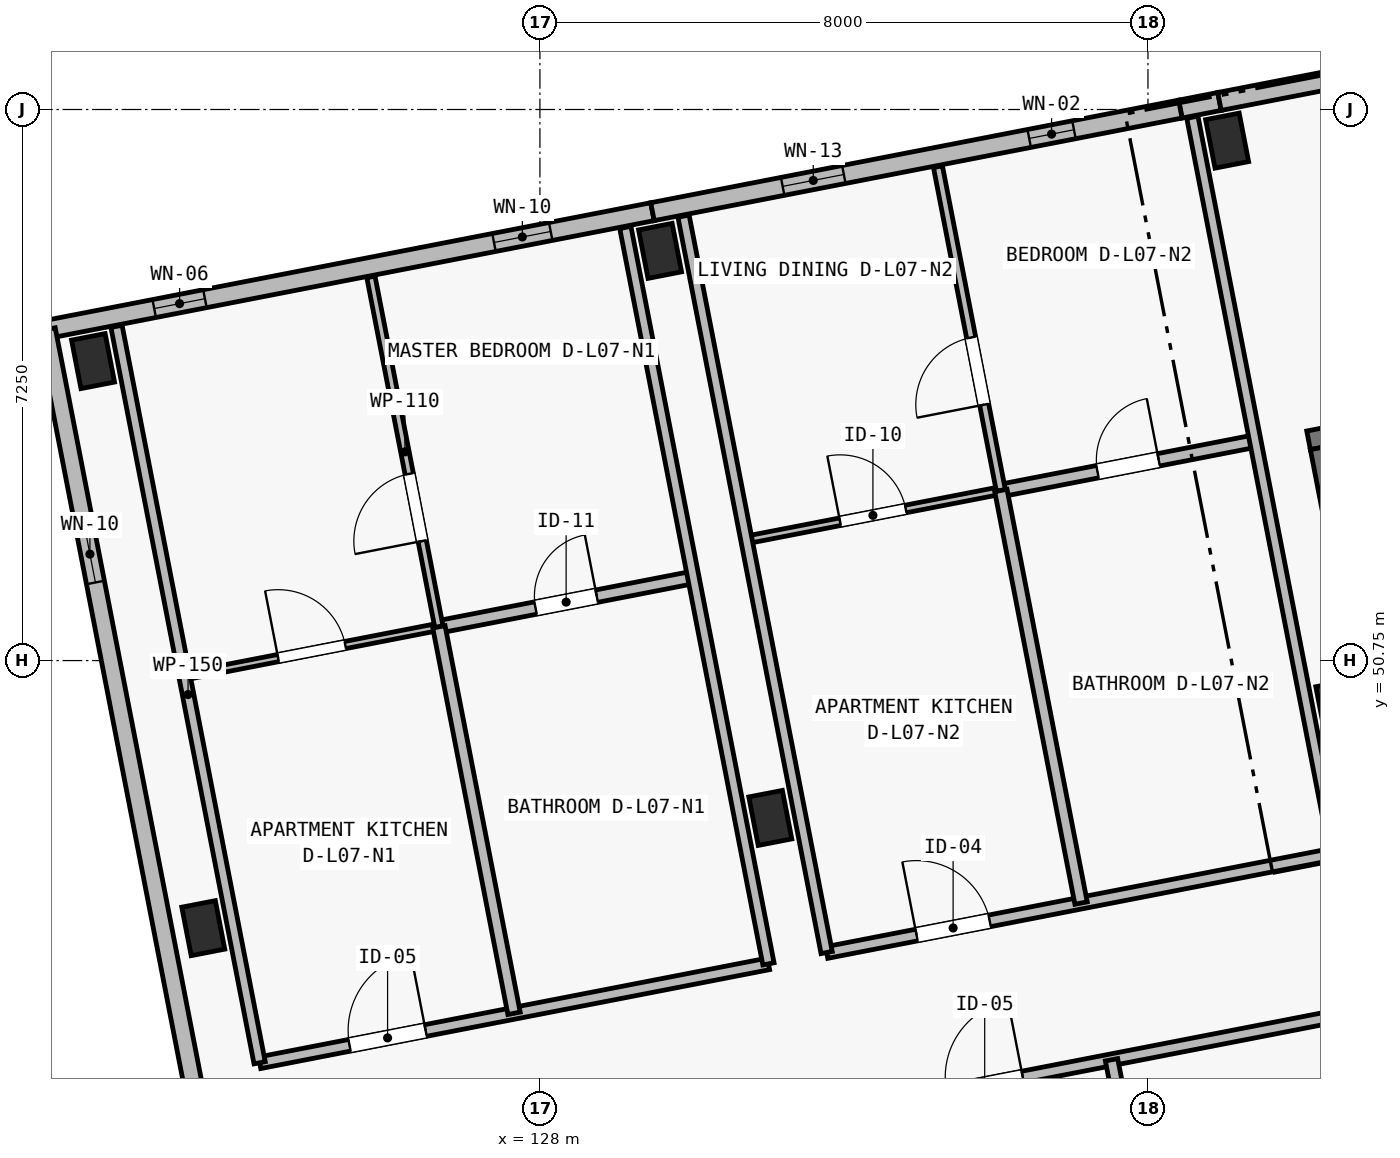
"""IFC4 building model, lengths in metres.
Left out: names, types, materials, properties, quantities, classifications, styles, units other than length and angle.
Written with IfcOpenShell. Run it as: python <this file> out.ifc"""

import sys

from ifc_helpers import new_model, si_unit, direction, frame, frame_2d, origin, origin_2d, place, context, subcontext, project, spatial, polyline, rectangle, outline, extrude, element, fill, save


model = new_model("IFC4")
c1 = context("Model", 3, precision=1e-05, world=origin(), true_north=direction((0.0, 1.0)))
c2 = subcontext(c1, "Body", "Model", "MODEL_VIEW")
j1 = project(units=[si_unit("LENGTHUNIT", "METRE"), si_unit("PLANEANGLEUNIT", "RADIAN")], contexts=[c1])
p1 = place(None, origin())
s1 = spatial("IfcSite", under=j1, at=p1, CompositionType="ELEMENT")
p2 = place(p1, origin())
s2 = spatial("IfcBuilding", under=s1, at=p2, CompositionType="ELEMENT")
p3 = place(p2, frame((0.0, 0.0, 24.65)))
s3 = spatial("IfcBuildingStorey", under=s2, at=p3, CompositionType="ELEMENT", Elevation=24.65)
for number, where, z_axis, x_axis in (
    (1, (123.571, 47.23, 0.0), (0.0, 0.0, 1.0), (0.982, 0.191, 0.0)),
    (2, (122.121, 54.69, 0.0), (0.0, 0.0, 1.0), (0.982, 0.191, 0.0)),
    (3, (131.031, 48.68, 0.0), (0.0, 0.0, 1.0), (0.982, 0.191, 0.0)),
    (4, (129.581, 56.14, 0.0), (0.0, 0.0, 1.0), (0.982, 0.191, 0.0)),
    (5, (138.491, 50.13, 0.0), (0.0, 0.0, 1.0), (0.982, 0.191, 0.0)),
    (6, (137.041, 57.59, 0.0), (0.0, 0.0, 1.0), (0.982, 0.191, 0.0)),
):
    element("IfcColumn", number, at=place(p3, frame(where, z_axis=z_axis, x_axis=x_axis)), inside=s3, PredefinedType="COLUMN", context=c2, shape_type="SweptSolid", body=[
        extrude(rectangle(XDim=0.45, YDim=0.65, at=origin_2d()), origin(), (0.0, 0.0, 1.0), 3.25),
    ])
p4 = place(p3, frame((138.113, 53.647, 0.0), z_axis=(0.0, 0.0, 1.0), x_axis=(0.981626097708, 0.19081458094, 0.0)))
e7 = element("IfcWall", 7, at=p4, inside=s3, PredefinedType="SHEAR", context=c2, shape_type="SweptSolid", body=[
    extrude(rectangle(XDim=7.0, YDim=0.25, at=frame_2d((3.5, 0.0))), origin(), (0.0, 0.0, 1.0), 3.25),
])
p5 = place(p4, frame((0.45, 0.0, 0.0)))
e8 = element("IfcOpeningElement", 8, at=p5, cuts=e7, PredefinedType="OPENING", context=c2, shape_type="SweptSolid", body=[
    extrude(rectangle(XDim=0.9, YDim=2.1, at=frame_2d((0.45, 1.05))), frame((0.0, 0.14, 0.0), z_axis=(0.0, -1.0, 0.0), x_axis=(1.0, 0.0, 0.0)), (0.0, 0.0, 1.0), 0.28),
])
p6 = place(p3, frame((138.804, 50.751, 0.0), z_axis=(0.0, 0.0, 1.0), x_axis=(-0.190858194834, 0.981617618762, 0.0)))
e9 = element("IfcWall", 9, at=p6, inside=s3, PredefinedType="SHEAR", context=c2, shape_type="SweptSolid", body=[
    extrude(rectangle(XDim=2.85, YDim=0.25, at=frame_2d((1.425, 0.0))), origin(), (0.0, 0.0, 1.0), 3.25),
])
p7 = place(p3, frame((121.505, 55.105, 0.0), z_axis=(0.0, 0.0, 1.0), x_axis=(0.981628367112, 0.190802905848, 0.0)))
e10 = element("IfcWall", 10, at=p7, inside=s3, PredefinedType="SOLIDWALL", context=c2, shape_type="SweptSolid", body=[
    extrude(outline(polyline([(0.0, 0.0), (8.125, 0.0), (8.125, 5.091), (0.0, 3.409), (0.0, 0.0)])), frame((0.0, 0.12, 0.0), z_axis=(0.0, -1.0, 0.0), x_axis=(1.0, 0.0, 0.0)), (0.0, 0.0, 1.0), 0.24),
])
p8 = place(p7, frame((1.447, 0.0, 0.44)))
e11 = element("IfcOpeningElement", 11, at=p8, cuts=e10, PredefinedType="OPENING", context=c2, shape_type="SweptSolid", body=[
    extrude(rectangle(XDim=0.68, YDim=2.24, at=frame_2d((0.34, 1.12))), frame((0.0, 0.135, 0.0), z_axis=(0.0, -1.0, 0.0), x_axis=(1.0, 0.0, 0.0)), (0.0, 0.0, 1.0), 0.27),
])
p9 = place(p7, frame((6.001, 0.0, 0.5)))
e12 = element("IfcOpeningElement", 12, at=p9, cuts=e10, PredefinedType="OPENING", context=c2, shape_type="SweptSolid", body=[
    extrude(rectangle(XDim=0.76, YDim=2.34, at=frame_2d((0.38, 1.17))), frame((0.0, 0.135, 0.0), z_axis=(0.0, -1.0, 0.0), x_axis=(1.0, 0.0, 0.0)), (0.0, 0.0, 1.0), 0.27),
])
p10 = place(p3, frame((136.426, 58.006, 0.0), z_axis=(0.0, 0.0, 1.0), x_axis=(0.981656509867, 0.190658062077, 0.0)))
e13 = element("IfcWall", 13, at=p10, inside=s3, PredefinedType="SOLIDWALL", context=c2, shape_type="SweptSolid", body=[
    extrude(rectangle(XDim=0.525, YDim=0.24, at=frame_2d((0.262, 0.0))), origin(), (0.0, 0.0, 1.0), 3.0),
])
p11 = place(p3, frame((129.481, 56.656, 0.0), z_axis=(0.0, 0.0, 1.0), x_axis=(0.981624188584, 0.190824401971, 0.0)))
e14 = element("IfcWall", 14, at=p11, inside=s3, PredefinedType="SOLIDWALL", context=c2, shape_type="SweptSolid", body=[
    extrude(outline(polyline([(0.0, 0.0), (7.075, 0.0), (7.075, 6.555), (0.0, 5.091), (0.0, 0.0)])), frame((0.0, 0.12, 0.0), z_axis=(0.0, -1.0, 0.0), x_axis=(1.0, 0.0, 0.0)), (0.0, 0.0, 1.0), 0.24),
])
p12 = place(p11, frame((1.745, 0.0, 0.5)))
e15 = element("IfcOpeningElement", 15, at=p12, cuts=e14, PredefinedType="OPENING", context=c2, shape_type="SweptSolid", body=[
    extrude(rectangle(XDim=0.82, YDim=2.18, at=frame_2d((0.41, 1.09))), frame((0.0, 0.135, 0.0), z_axis=(0.0, -1.0, 0.0), x_axis=(1.0, 0.0, 0.0)), (0.0, 0.0, 1.0), 0.27),
])
p13 = place(p11, frame((5.05, 0.0, 0.44)))
e16 = element("IfcOpeningElement", 16, at=p13, cuts=e14, PredefinedType="OPENING", context=c2, shape_type="SweptSolid", body=[
    extrude(rectangle(XDim=0.6, YDim=2.22, at=frame_2d((0.3, 1.11))), frame((0.0, 0.135, 0.0), z_axis=(0.0, -1.0, 0.0), x_axis=(1.0, 0.0, 0.0)), (0.0, 0.0, 1.0), 0.27),
])
p14 = place(p3, frame((136.941, 58.106, 0.0), z_axis=(0.0, 0.0, 1.0), x_axis=(0.981629832251, 0.190795367961, 0.0)))
e17 = element("IfcWall", 17, at=p14, inside=s3, PredefinedType="SOLIDWALL", context=c2, shape_type="SweptSolid", body=[
    extrude(rectangle(XDim=2.375, YDim=0.24, at=frame_2d((1.188, 0.0))), origin(), (0.0, 0.0, 1.0), 3.0),
])
p15 = place(p3, frame((125.445, 34.835, 0.0), z_axis=(0.0, 0.0, 1.0), x_axis=(-0.190808900739, 0.981627201843, 0.0)))
e18 = element("IfcWall", 18, at=p15, inside=s3, PredefinedType="SOLIDWALL", context=c2, shape_type="SweptSolid", body=[
    extrude(rectangle(XDim=20.65, YDim=0.24, at=frame_2d((10.325, 0.0))), origin(), (0.0, 0.0, 1.0), 3.409),
])
p16 = place(p15, frame((2.99, 0.0, 0.52)))
e19 = element("IfcOpeningElement", 19, at=p16, cuts=e18, PredefinedType="OPENING", context=c2, shape_type="SweptSolid", body=[
    extrude(rectangle(XDim=0.62, YDim=2.28, at=frame_2d((0.31, 1.14))), frame((0.0, 0.135, 0.0), z_axis=(0.0, -1.0, 0.0), x_axis=(1.0, 0.0, 0.0)), (0.0, 0.0, 1.0), 0.27),
])
p17 = place(p15, frame((17.26, 0.0, 0.45)))
e20 = element("IfcOpeningElement", 20, at=p17, cuts=e18, PredefinedType="OPENING", context=c2, shape_type="SweptSolid", body=[
    extrude(rectangle(XDim=0.76, YDim=2.34, at=frame_2d((0.38, 1.17))), frame((0.0, 0.135, 0.0), z_axis=(0.0, -1.0, 0.0), x_axis=(1.0, 0.0, 0.0)), (0.0, 0.0, 1.0), 0.27),
])
p18 = place(p3, frame((132.021, 44.818, 0.0), z_axis=(0.0, 0.0, 1.0), x_axis=(0.981629109582, 0.190799086008, 0.0)))
e21 = element("IfcWall", 21, at=p18, inside=s3, PredefinedType="PARTITIONING", context=c2, shape_type="SweptSolid", body=[
    extrude(rectangle(XDim=7.13, YDim=0.155, at=frame_2d((3.565, 0.0))), origin(), (0.0, 0.0, 1.0), 2.97),
])
p19 = place(p18, frame((1.355, 0.0, 0.0)))
e22 = element("IfcOpeningElement", 22, at=p19, cuts=e21, PredefinedType="OPENING", context=c2, shape_type="SweptSolid", body=[
    extrude(rectangle(XDim=1.02, YDim=2.2, at=frame_2d((0.51, 1.1))), frame((0.0, 0.093, 0.0), z_axis=(0.0, -1.0, 0.0), x_axis=(1.0, 0.0, 0.0)), (0.0, 0.0, 1.0), 0.185),
])
p20 = place(p3, frame((136.297, 41.503, 0.0), z_axis=(0.0, 0.0, 1.0), x_axis=(-0.190807044121, 0.981627562731, 0.0)))
e23 = element("IfcWall", 23, at=p20, inside=s3, PredefinedType="PLUMBINGWALL", context=c2, shape_type="SweptSolid", body=[
    extrude(rectangle(XDim=4.07, YDim=0.165, at=frame_2d((2.035, 0.0))), origin(), (0.0, 0.0, 1.0), 2.97),
])
p21 = place(p3, frame((124.312, 45.459, 0.0), z_axis=(0.0, 0.0, 1.0), x_axis=(0.981627870431, 0.190805461121, 0.0)))
e24 = element("IfcWall", 24, at=p21, inside=s3, PredefinedType="PARTITIONING", context=c2, shape_type="SweptSolid", body=[
    extrude(rectangle(XDim=6.82, YDim=0.155, at=frame_2d((3.41, 0.0))), origin(), (0.0, 0.0, 1.0), 3.15),
])
p22 = place(p21, frame((1.205, 0.0, 0.0)))
e25 = element("IfcOpeningElement", 25, at=p22, cuts=e24, PredefinedType="OPENING", context=c2, shape_type="SweptSolid", body=[
    extrude(rectangle(XDim=1.02, YDim=2.2, at=frame_2d((0.51, 1.1))), frame((0.0, 0.093, 0.0), z_axis=(0.0, -1.0, 0.0), x_axis=(1.0, 0.0, 0.0)), (0.0, 0.0, 1.0), 0.185),
])
p23 = place(p3, frame((123.324, 50.543, 0.0), z_axis=(0.0, 0.0, 1.0), x_axis=(0.981629173664, 0.190798756314, 0.0)))
e26 = element("IfcWall", 26, at=p23, inside=s3, PredefinedType="PARTITIONING", context=c2, shape_type="SweptSolid", body=[
    extrude(rectangle(XDim=3.41, YDim=0.095, at=frame_2d((1.705, 0.0))), origin(), (0.0, 0.0, 1.0), 3.15),
])
p24 = place(p23, frame((1.255, 0.0, 0.0)))
e27 = element("IfcOpeningElement", 27, at=p24, cuts=e26, PredefinedType="OPENING", context=c2, shape_type="SweptSolid", body=[
    extrude(rectangle(XDim=0.9, YDim=2.1, at=frame_2d((0.45, 1.05))), frame((0.0, 0.062, 0.0), z_axis=(0.0, -1.0, 0.0), x_axis=(1.0, 0.0, 0.0)), (0.0, 0.0, 1.0), 0.125),
])
p25 = place(p3, frame((126.671, 51.194, 0.0), z_axis=(0.0, 0.0, 1.0), x_axis=(0.981629173664, 0.190798756314, 0.0)))
e28 = element("IfcWall", 28, at=p25, inside=s3, PredefinedType="PLUMBINGWALL", context=c2, shape_type="SweptSolid", body=[
    extrude(rectangle(XDim=3.41, YDim=0.165, at=frame_2d((1.705, 0.0))), origin(), (0.0, 0.0, 1.0), 3.15),
])
p26 = place(p25, frame((1.295, 0.0, 0.0)))
e29 = element("IfcOpeningElement", 29, at=p26, cuts=e28, PredefinedType="OPENING", context=c2, shape_type="SweptSolid", body=[
    extrude(rectangle(XDim=0.82, YDim=2.08, at=frame_2d((0.41, 1.04))), frame((0.0, 0.097, 0.0), z_axis=(0.0, -1.0, 0.0), x_axis=(1.0, 0.0, 0.0)), (0.0, 0.0, 1.0), 0.195),
])
p27 = place(p3, frame((126.671, 51.194, 0.0), z_axis=(0.0, 0.0, 1.0), x_axis=(-0.190787451574, 0.981631370893, 0.0)))
e30 = element("IfcWall", 30, at=p27, inside=s3, PredefinedType="PARTITIONING", context=c2, shape_type="SweptSolid", body=[
    extrude(rectangle(XDim=4.69, YDim=0.11, at=frame_2d((2.345, 0.0))), origin(), (0.0, 0.0, 1.0), 3.15),
])
p28 = place(p27, frame((1.15, 0.0, 0.0)))
e31 = element("IfcOpeningElement", 31, at=p28, cuts=e30, PredefinedType="OPENING", context=c2, shape_type="SweptSolid", body=[
    extrude(rectangle(XDim=0.9, YDim=2.1, at=frame_2d((0.45, 1.05))), frame((0.0, 0.07, 0.0), z_axis=(0.0, -1.0, 0.0), x_axis=(1.0, 0.0, 0.0)), (0.0, 0.0, 1.0), 0.14),
])
p29 = place(p3, frame((127.66, 46.109, 0.0), z_axis=(0.0, 0.0, 1.0), x_axis=(-0.190838120755, 0.981621521599, 0.0)))
e32 = element("IfcWall", 32, at=p29, inside=s3, PredefinedType="PLUMBINGWALL", context=c2, shape_type="SweptSolid", body=[
    extrude(rectangle(XDim=5.18, YDim=0.165, at=frame_2d((2.59, 0.0))), origin(), (0.0, 0.0, 1.0), 3.15),
])
p30 = place(p3, frame((124.312, 45.459, 0.0), z_axis=(0.0, 0.0, 1.0), x_axis=(-0.190814044018, 0.981626202078, 0.0)))
e33 = element("IfcWall", 33, at=p30, inside=s3, PredefinedType="PARTITIONING", context=c2, shape_type="SweptSolid", body=[
    extrude(rectangle(XDim=9.87, YDim=0.15, at=frame_2d((4.935, 0.0))), origin(), (0.0, 0.0, 1.0), 3.15),
])
p31 = place(p3, frame((131.007, 46.76, 0.0), z_axis=(0.0, 0.0, 1.0), x_axis=(-0.190809410863, 0.981627102685, 0.0)))
e34 = element("IfcWall", 34, at=p31, inside=s3, PredefinedType="PARTITIONING", context=c2, shape_type="SweptSolid", body=[
    extrude(rectangle(XDim=9.87, YDim=0.15, at=frame_2d((4.935, 0.0))), origin(), (0.0, 0.0, 1.0), 3.15),
])
p32 = place(p3, frame((131.772, 46.909, 0.0), z_axis=(0.0, 0.0, 1.0), x_axis=(0.981622468528, 0.190833249935, 0.0)))
e35 = element("IfcWall", 35, at=p32, inside=s3, PredefinedType="PARTITIONING", context=c2, shape_type="SweptSolid", body=[
    extrude(rectangle(XDim=6.82, YDim=0.155, at=frame_2d((3.41, 0.0))), origin(), (0.0, 0.0, 1.0), 2.97),
])
p33 = place(p32, frame((1.205, 0.0, 0.0)))
e36 = element("IfcOpeningElement", 36, at=p33, cuts=e35, PredefinedType="OPENING", context=c2, shape_type="SweptSolid", body=[
    extrude(rectangle(XDim=0.98, YDim=2.15, at=frame_2d((0.49, 1.075))), frame((0.0, 0.093, 0.0), z_axis=(0.0, -1.0, 0.0), x_axis=(1.0, 0.0, 0.0)), (0.0, 0.0, 1.0), 0.185),
])
p34 = place(p3, frame((130.717, 52.337, 0.0), z_axis=(0.0, 0.0, 1.0), x_axis=(0.981629173664, 0.190798756314, 0.0)))
e37 = element("IfcWall", 37, at=p34, inside=s3, PredefinedType="PARTITIONING", context=c2, shape_type="SweptSolid", body=[
    extrude(rectangle(XDim=3.41, YDim=0.1, at=frame_2d((1.705, 0.0))), origin(), (0.0, 0.0, 1.0), 2.97),
])
p35 = place(p34, frame((1.255, 0.0, 0.0)))
e38 = element("IfcOpeningElement", 38, at=p35, cuts=e37, PredefinedType="OPENING", context=c2, shape_type="SweptSolid", body=[
    extrude(rectangle(XDim=0.88, YDim=2.1, at=frame_2d((0.44, 1.05))), frame((0.0, 0.065, 0.0), z_axis=(0.0, -1.0, 0.0), x_axis=(1.0, 0.0, 0.0)), (0.0, 0.0, 1.0), 0.13),
])
p36 = place(p3, frame((134.065, 52.988, 0.0), z_axis=(0.0, 0.0, 1.0), x_axis=(0.981629173664, 0.190798756314, 0.0)))
e39 = element("IfcWall", 39, at=p36, inside=s3, PredefinedType="PLUMBINGWALL", context=c2, shape_type="SweptSolid", body=[
    extrude(rectangle(XDim=3.41, YDim=0.165, at=frame_2d((1.705, 0.0))), origin(), (0.0, 0.0, 1.0), 2.97),
])
p37 = place(p36, frame((1.295, 0.0, 0.0)))
e40 = element("IfcOpeningElement", 40, at=p37, cuts=e39, PredefinedType="OPENING", context=c2, shape_type="SweptSolid", body=[
    extrude(rectangle(XDim=0.82, YDim=2.08, at=frame_2d((0.41, 1.04))), frame((0.0, 0.097, 0.0), z_axis=(0.0, -1.0, 0.0), x_axis=(1.0, 0.0, 0.0)), (0.0, 0.0, 1.0), 0.195),
])
p38 = place(p3, frame((134.065, 52.988, 0.0), z_axis=(0.0, 0.0, 1.0), x_axis=(-0.190812443151, 0.981626513262, 0.0)))
e41 = element("IfcWall", 41, at=p38, inside=s3, PredefinedType="PARTITIONING", context=c2, shape_type="SweptSolid", body=[
    extrude(rectangle(XDim=4.34, YDim=0.12, at=frame_2d((2.17, 0.0))), origin(), (0.0, 0.0, 1.0), 2.97),
])
p39 = place(p38, frame((1.15, 0.0, 0.0)))
e42 = element("IfcOpeningElement", 42, at=p39, cuts=e41, PredefinedType="OPENING", context=c2, shape_type="SweptSolid", body=[
    extrude(rectangle(XDim=0.9, YDim=2.1, at=frame_2d((0.45, 1.05))), frame((0.0, 0.075, 0.0), z_axis=(0.0, -1.0, 0.0), x_axis=(1.0, 0.0, 0.0)), (0.0, 0.0, 1.0), 0.15),
])
p40 = place(p3, frame((135.12, 47.559, 0.0), z_axis=(0.0, 0.0, 1.0), x_axis=(-0.190807031124, 0.981627565258, 0.0)))
e43 = element("IfcWall", 43, at=p40, inside=s3, PredefinedType="PLUMBINGWALL", context=c2, shape_type="SweptSolid", body=[
    extrude(rectangle(XDim=5.53, YDim=0.165, at=frame_2d((2.765, 0.0))), origin(), (0.0, 0.0, 1.0), 2.97),
])
p41 = place(p3, frame((131.772, 46.909, 0.0), z_axis=(0.0, 0.0, 1.0), x_axis=(-0.1907855758, 0.981631735462, 0.0)))
e44 = element("IfcWall", 44, at=p41, inside=s3, PredefinedType="PARTITIONING", context=c2, shape_type="SweptSolid", body=[
    extrude(rectangle(XDim=9.87, YDim=0.15, at=frame_2d((4.935, 0.0))), origin(), (0.0, 0.0, 1.0), 2.97),
])
p42 = place(p3, frame((138.467, 48.21, 0.0), z_axis=(0.0, 0.0, 1.0), x_axis=(-0.190814044018, 0.981626202078, 0.0)))
e45 = element("IfcWall", 45, at=p42, inside=s3, PredefinedType="PARTITIONING", context=c2, shape_type="SweptSolid", body=[
    extrude(rectangle(XDim=9.87, YDim=0.15, at=frame_2d((4.935, 0.0))), origin(), (0.0, 0.0, 1.0), 2.97),
])
p43 = place(p8, origin())
e46 = element("IfcWindow", 46, at=p43, inside=s3, PartitioningType="SINGLE_PANEL", PredefinedType="WINDOW", context=c2, shape_type="SweptSolid", body=[
    extrude(rectangle(XDim=0.68, YDim=2.24, at=frame_2d((0.34, 1.12))), frame((0.0, 0.03, 0.0), z_axis=(0.0, -1.0, 0.0), x_axis=(1.0, 0.0, 0.0)), (0.0, 0.0, 1.0), 0.06),
])
fill(e11, e46)
p44 = place(p9, origin())
e47 = element("IfcWindow", 47, at=p44, inside=s3, PartitioningType="SINGLE_PANEL", PredefinedType="WINDOW", context=c2, shape_type="SweptSolid", body=[
    extrude(rectangle(XDim=0.76, YDim=2.34, at=frame_2d((0.38, 1.17))), frame((0.0, 0.03, 0.0), z_axis=(0.0, -1.0, 0.0), x_axis=(1.0, 0.0, 0.0)), (0.0, 0.0, 1.0), 0.06),
])
fill(e12, e47)
p45 = place(p12, origin())
e48 = element("IfcWindow", 48, at=p45, inside=s3, PartitioningType="SINGLE_PANEL", PredefinedType="WINDOW", context=c2, shape_type="SweptSolid", body=[
    extrude(rectangle(XDim=0.82, YDim=2.18, at=frame_2d((0.41, 1.09))), frame((0.0, 0.03, 0.0), z_axis=(0.0, -1.0, 0.0), x_axis=(1.0, 0.0, 0.0)), (0.0, 0.0, 1.0), 0.06),
])
fill(e15, e48)
p46 = place(p13, origin())
e49 = element("IfcWindow", 49, at=p46, inside=s3, PartitioningType="SINGLE_PANEL", PredefinedType="WINDOW", context=c2, shape_type="SweptSolid", body=[
    extrude(rectangle(XDim=0.6, YDim=2.22, at=frame_2d((0.3, 1.11))), frame((0.0, 0.03, 0.0), z_axis=(0.0, -1.0, 0.0), x_axis=(1.0, 0.0, 0.0)), (0.0, 0.0, 1.0), 0.06),
])
fill(e16, e49)
p47 = place(p17, origin())
e50 = element("IfcWindow", 50, at=p47, inside=s3, PartitioningType="SINGLE_PANEL", PredefinedType="WINDOW", context=c2, shape_type="SweptSolid", body=[
    extrude(rectangle(XDim=0.76, YDim=2.34, at=frame_2d((0.38, 1.17))), frame((0.0, 0.03, 0.0), z_axis=(0.0, -1.0, 0.0), x_axis=(1.0, 0.0, 0.0)), (0.0, 0.0, 1.0), 0.06),
])
fill(e20, e50)
p48 = place(p19, origin())
e51 = element("IfcDoor", 51, at=p48, inside=s3, OperationType="SINGLE_SWING_RIGHT", PredefinedType="DOOR", context=c2, shape_type="SweptSolid", body=[
    extrude(rectangle(XDim=1.02, YDim=2.2, at=frame_2d((0.51, 1.1))), frame((0.0, 0.025, 0.0), z_axis=(0.0, -1.0, 0.0), x_axis=(1.0, 0.0, 0.0)), (0.0, 0.0, 1.0), 0.05),
])
fill(e22, e51)
p49 = place(p22, origin())
e52 = element("IfcDoor", 52, at=p49, inside=s3, OperationType="SINGLE_SWING_RIGHT", PredefinedType="DOOR", context=c2, shape_type="SweptSolid", body=[
    extrude(rectangle(XDim=1.02, YDim=2.2, at=frame_2d((0.51, 1.1))), frame((0.0, 0.025, 0.0), z_axis=(0.0, -1.0, 0.0), x_axis=(1.0, 0.0, 0.0)), (0.0, 0.0, 1.0), 0.05),
])
fill(e25, e52)
p50 = place(p24, origin())
e53 = element("IfcDoor", 53, at=p50, inside=s3, OperationType="SINGLE_SWING_LEFT", PredefinedType="DOOR", context=c2, shape_type="SweptSolid", body=[
    extrude(rectangle(XDim=0.9, YDim=2.1, at=frame_2d((0.45, 1.05))), frame((0.0, 0.025, 0.0), z_axis=(0.0, -1.0, 0.0), x_axis=(1.0, 0.0, 0.0)), (0.0, 0.0, 1.0), 0.05),
])
fill(e27, e53)
p51 = place(p26, origin())
e54 = element("IfcDoor", 54, at=p51, inside=s3, OperationType="SINGLE_SWING_RIGHT", PredefinedType="DOOR", context=c2, shape_type="SweptSolid", body=[
    extrude(rectangle(XDim=0.82, YDim=2.08, at=frame_2d((0.41, 1.04))), frame((0.0, 0.025, 0.0), z_axis=(0.0, -1.0, 0.0), x_axis=(1.0, 0.0, 0.0)), (0.0, 0.0, 1.0), 0.05),
])
fill(e29, e54)
p52 = place(p28, origin())
e55 = element("IfcDoor", 55, at=p52, inside=s3, OperationType="SINGLE_SWING_LEFT", PredefinedType="DOOR", context=c2, shape_type="SweptSolid", body=[
    extrude(rectangle(XDim=0.9, YDim=2.1, at=frame_2d((0.45, 1.05))), frame((0.0, 0.025, 0.0), z_axis=(0.0, -1.0, 0.0), x_axis=(1.0, 0.0, 0.0)), (0.0, 0.0, 1.0), 0.05),
])
fill(e31, e55)
p53 = place(p33, origin())
e56 = element("IfcDoor", 56, at=p53, inside=s3, OperationType="SINGLE_SWING_LEFT", PredefinedType="DOOR", context=c2, shape_type="SweptSolid", body=[
    extrude(rectangle(XDim=0.98, YDim=2.15, at=frame_2d((0.49, 1.075))), frame((0.0, 0.025, 0.0), z_axis=(0.0, -1.0, 0.0), x_axis=(1.0, 0.0, 0.0)), (0.0, 0.0, 1.0), 0.05),
])
fill(e36, e56)
p54 = place(p35, origin())
e57 = element("IfcDoor", 57, at=p54, inside=s3, OperationType="SINGLE_SWING_LEFT", PredefinedType="DOOR", context=c2, shape_type="SweptSolid", body=[
    extrude(rectangle(XDim=0.88, YDim=2.1, at=frame_2d((0.44, 1.05))), frame((0.0, 0.025, 0.0), z_axis=(0.0, -1.0, 0.0), x_axis=(1.0, 0.0, 0.0)), (0.0, 0.0, 1.0), 0.05),
])
fill(e38, e57)
p55 = place(p37, origin())
e58 = element("IfcDoor", 58, at=p55, inside=s3, OperationType="SINGLE_SWING_RIGHT", PredefinedType="DOOR", context=c2, shape_type="SweptSolid", body=[
    extrude(rectangle(XDim=0.82, YDim=2.08, at=frame_2d((0.41, 1.04))), frame((0.0, 0.025, 0.0), z_axis=(0.0, -1.0, 0.0), x_axis=(1.0, 0.0, 0.0)), (0.0, 0.0, 1.0), 0.05),
])
fill(e40, e58)
p56 = place(p39, origin())
e59 = element("IfcDoor", 59, at=p56, inside=s3, OperationType="SINGLE_SWING_LEFT", PredefinedType="DOOR", context=c2, shape_type="SweptSolid", body=[
    extrude(rectangle(XDim=0.9, YDim=2.1, at=frame_2d((0.45, 1.05))), frame((0.0, 0.025, 0.0), z_axis=(0.0, -1.0, 0.0), x_axis=(1.0, 0.0, 0.0)), (0.0, 0.0, 1.0), 0.05),
])
fill(e42, e59)
save(model, sys.argv[1])
